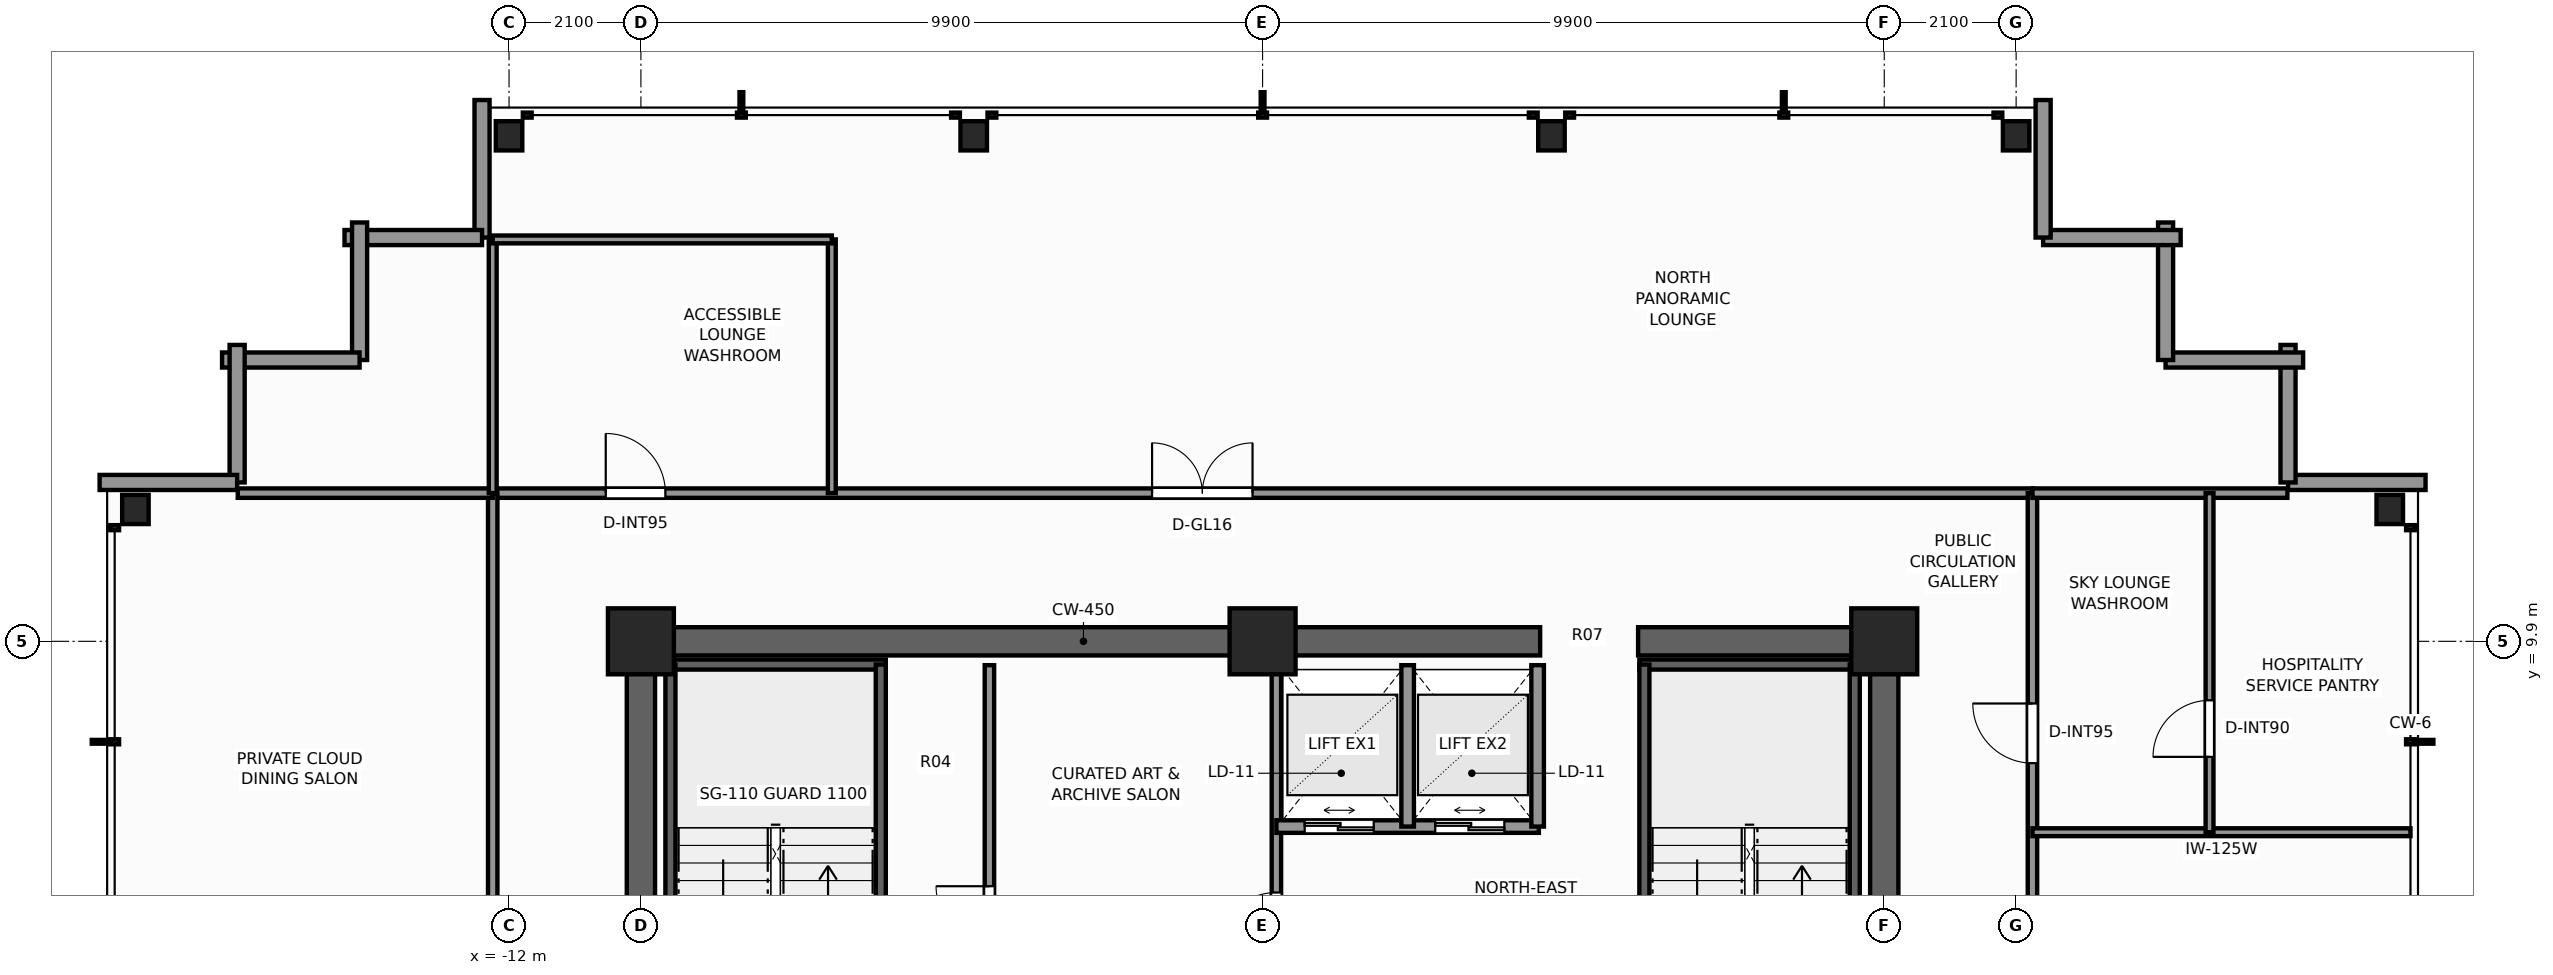
"""IFC4 building model, lengths in metres.
Left out: names, types, materials, properties, quantities, classifications, styles, units other than length and angle.
Written with IfcOpenShell. Run it as: python <this file> out.ifc"""

import sys

from ifc_helpers import new_model, si_unit, direction, frame, frame_2d, origin, origin_2d, place, context, subcontext, project, spatial, rectangle, i_section, extrude, element, fill, save


model = new_model("IFC4")
c1 = context("Model", 3, precision=1e-05, world=origin(), true_north=direction((0.0, 1.0)))
c2 = subcontext(c1, "Body", "Model", "MODEL_VIEW")
j1 = project(units=[si_unit("LENGTHUNIT", "METRE"), si_unit("PLANEANGLEUNIT", "RADIAN")], contexts=[c1])
p1 = place(None, origin())
s1 = spatial("IfcSite", under=j1, at=p1, CompositionType="ELEMENT")
p2 = place(p1, origin())
s2 = spatial("IfcBuilding", under=s1, at=p2, CompositionType="ELEMENT")
p3 = place(p2, frame((0.0, 0.0, 258.4)))
s3 = spatial("IfcBuildingStorey", under=s2, at=p3, CompositionType="ELEMENT", Elevation=258.4)
p4 = place(p3, frame((-10.125, 9.9, 0.0), z_axis=(0.0, 0.0, 1.0), x_axis=(1.0, 0.0, 0.0)))
e1 = element("IfcWall", 1, at=p4, inside=s3, PredefinedType="SHEAR", context=c2, shape_type="SweptSolid", body=[
    extrude(rectangle(XDim=14.545, YDim=0.45, at=frame_2d((7.272, 0.0))), origin(), (0.0, 0.0, 1.0), 4.4),
])
p5 = place(p3, frame((5.98, 9.9, 0.0), z_axis=(0.0, 0.0, 1.0), x_axis=(1.0, 0.0, 0.0)))
e2 = element("IfcWall", 2, at=p5, inside=s3, PredefinedType="SHEAR", context=c2, shape_type="SweptSolid", body=[
    extrude(rectangle(XDim=4.145, YDim=0.45, at=frame_2d((2.073, 0.0))), origin(), (0.0, 0.0, 1.0), 4.4),
])
p6 = place(p3, frame((-9.9, -3.7, 0.0), z_axis=(0.0, 0.0, 1.0), x_axis=(0.0, 1.0, 0.0)))
e3 = element("IfcWall", 3, at=p6, inside=s3, PredefinedType="SHEAR", context=c2, shape_type="SweptSolid", body=[
    extrude(rectangle(XDim=13.375, YDim=0.45, at=frame_2d((6.688, 0.0))), origin(), (0.0, 0.0, 1.0), 4.4),
])
p7 = place(p6, frame((0.35, 0.0, 0.0)))
e4 = element("IfcOpeningElement", 4, at=p7, cuts=e3, PredefinedType="OPENING", context=c2, shape_type="SweptSolid", body=[
    extrude(rectangle(XDim=1.1, YDim=2.2, at=frame_2d((0.55, 1.1))), frame((0.0, 0.235, 0.0), z_axis=(0.0, -1.0, 0.0), x_axis=(1.0, 0.0, 0.0)), (0.0, 0.0, 1.0), 0.47),
])
p8 = place(p3, frame((9.9, -3.7, 0.0), z_axis=(0.0, 0.0, 1.0), x_axis=(0.0, 1.0, 0.0)))
e5 = element("IfcWall", 5, at=p8, inside=s3, PredefinedType="SHEAR", context=c2, shape_type="SweptSolid", body=[
    extrude(rectangle(XDim=13.375, YDim=0.45, at=frame_2d((6.688, 0.0))), origin(), (0.0, 0.0, 1.0), 4.4),
])
p9 = place(p8, frame((0.35, 0.0, 0.0)))
e6 = element("IfcOpeningElement", 6, at=p9, cuts=e5, PredefinedType="OPENING", context=c2, shape_type="SweptSolid", body=[
    extrude(rectangle(XDim=1.1, YDim=2.2, at=frame_2d((0.55, 1.1))), frame((0.0, 0.235, 0.0), z_axis=(0.0, -1.0, 0.0), x_axis=(1.0, 0.0, 0.0)), (0.0, 0.0, 1.0), 0.47),
])
for number, where, z_axis, x_axis in (
    (7, (9.9, 9.9, 0.0), (0.0, 0.0, 1.0), (1.0, 0.0, 0.0)),
    (8, (-9.9, 9.9, 0.0), (0.0, 0.0, 1.0), (1.0, 0.0, 0.0)),
    (9, (0.0, 9.9, 0.0), (0.0, 0.0, 1.0), (1.0, 0.0, 0.0)),
):
    element("IfcColumn", number, at=place(p3, frame(where, z_axis=z_axis, x_axis=x_axis)), inside=s3, PredefinedType="COLUMN", context=c2, shape_type="SweptSolid", body=[
        extrude(rectangle(XDim=1.05, YDim=1.05, at=origin_2d()), origin(), (0.0, 0.0, 1.0), 4.4),
    ])
for number, where, z_axis, x_axis in (
    (10, (-12.0, 17.95, 0.0), (0.0, 0.0, 1.0), (1.0, 0.0, 0.0)),
    (11, (-4.6, 17.95, 0.0), (0.0, 0.0, 1.0), (1.0, 0.0, 0.0)),
    (12, (4.6, 17.95, 0.0), (0.0, 0.0, 1.0), (1.0, 0.0, 0.0)),
    (13, (12.0, 17.95, 0.0), (0.0, 0.0, 1.0), (1.0, 0.0, 0.0)),
    (14, (-17.95, 12.0, 0.0), (0.0, 0.0, 1.0), (1.0, 0.0, 0.0)),
    (15, (17.95, 12.0, 0.0), (0.0, 0.0, 1.0), (1.0, 0.0, 0.0)),
):
    element("IfcColumn", number, at=place(p3, frame(where, z_axis=z_axis, x_axis=x_axis)), inside=s3, PredefinedType="COLUMN", context=c2, shape_type="SweptSolid", body=[
        extrude(i_section(OverallWidth=0.422, OverallDepth=0.465, WebThickness=0.045, FlangeThickness=0.073, FilletRadius=0.025, at=origin_2d()), origin(), (0.0, 0.0, 1.0), 4.4),
    ])
p10 = place(p3, frame((16.33, 12.43, 0.0), z_axis=(0.0, 0.0, 1.0), x_axis=(1.0, 0.0, 0.0)))
e16 = element("IfcWall", 16, at=p10, inside=s3, PredefinedType="STANDARD", context=c2, shape_type="SweptSolid", body=[
    extrude(rectangle(XDim=2.19, YDim=0.24, at=frame_2d((1.095, 0.0))), origin(), (0.0, 0.0, 1.0), 3.503),
])
for number, where, z_axis, x_axis in (
    (17, (16.33, 14.62, 0.0), (0.0, 0.0, 1.0), (0.0, -1.0, 0.0)),
    (18, (14.38, 14.38, 0.0), (0.0, 0.0, 1.0), (1.0, 0.0, 0.0)),
    (19, (14.38, 16.57, 0.0), (0.0, 0.0, 1.0), (0.0, -1.0, 0.0)),
    (20, (12.43, 16.33, 0.0), (0.0, 0.0, 1.0), (1.0, 0.0, 0.0)),
):
    element("IfcWall", number, at=place(p3, frame(where, z_axis=z_axis, x_axis=x_axis)), inside=s3, PredefinedType="STANDARD", context=c2, shape_type="SweptSolid", body=[
        extrude(rectangle(XDim=2.19, YDim=0.24, at=frame_2d((1.095, 0.0))), origin(), (0.0, 0.0, 1.0), 3.503),
    ])
for number, where, z_axis, x_axis in (
    (21, (12.43, 18.52, 0.0), (0.0, 0.0, 1.0), (0.0, -1.0, 0.0)),
    (22, (-12.43, 16.33, 0.0), (0.0, 0.0, 1.0), (0.0, 1.0, 0.0)),
):
    element("IfcWall", number, at=place(p3, frame(where, z_axis=z_axis, x_axis=x_axis)), inside=s3, PredefinedType="STANDARD", context=c2, shape_type="SweptSolid", body=[
        extrude(rectangle(XDim=2.19, YDim=0.24, at=frame_2d((1.095, 0.0))), origin(), (0.0, 0.0, 1.0), 3.503),
    ])
for number, where, z_axis, x_axis in (
    (23, (-14.62, 16.33, 0.0), (0.0, 0.0, 1.0), (1.0, 0.0, 0.0)),
    (24, (-14.38, 14.38, 0.0), (0.0, 0.0, 1.0), (0.0, 1.0, 0.0)),
    (25, (-16.57, 14.38, 0.0), (0.0, 0.0, 1.0), (1.0, 0.0, 0.0)),
    (26, (-16.33, 12.43, 0.0), (0.0, 0.0, 1.0), (0.0, 1.0, 0.0)),
):
    element("IfcWall", number, at=place(p3, frame(where, z_axis=z_axis, x_axis=x_axis)), inside=s3, PredefinedType="STANDARD", context=c2, shape_type="SweptSolid", body=[
        extrude(rectangle(XDim=2.19, YDim=0.24, at=frame_2d((1.095, 0.0))), origin(), (0.0, 0.0, 1.0), 3.503),
    ])
p11 = place(p3, frame((-18.52, 12.43, 0.0), z_axis=(0.0, 0.0, 1.0), x_axis=(1.0, 0.0, 0.0)))
e27 = element("IfcWall", 27, at=p11, inside=s3, PredefinedType="STANDARD", context=c2, shape_type="SweptSolid", body=[
    extrude(rectangle(XDim=2.19, YDim=0.24, at=frame_2d((1.095, 0.0))), origin(), (0.0, 0.0, 1.0), 3.503),
])
p12 = place(p3, frame((-9.52, 9.53, 0.0), z_axis=(0.0, 0.0, 1.0), x_axis=(1.0, 0.0, 0.0)))
e28 = element("IfcWall", 28, at=p12, inside=s3, PredefinedType="SHEAR", context=c2, shape_type="SweptSolid", body=[
    extrude(rectangle(XDim=3.52, YDim=0.16, at=frame_2d((1.76, 0.0))), origin(), (0.0, 0.0, 1.0), 4.4),
])
for number, where, z_axis, x_axis in (
    (29, (-9.43, 1.97, 0.0), (0.0, 0.0, 1.0), (0.0, 1.0, 0.0)),
    (30, (-6.08, 1.97, 0.0), (0.0, 0.0, 1.0), (0.0, 1.0, 0.0)),
):
    element("IfcWall", number, at=place(p3, frame(where, z_axis=z_axis, x_axis=x_axis)), inside=s3, PredefinedType="SHEAR", context=c2, shape_type="SweptSolid", body=[
        extrude(rectangle(XDim=7.56, YDim=0.16, at=frame_2d((3.78, 0.0))), origin(), (0.0, 0.0, 1.0), 4.4),
    ])
p13 = place(p3, frame((6.0, 9.53, 0.0), z_axis=(0.0, 0.0, 1.0), x_axis=(1.0, 0.0, 0.0)))
e31 = element("IfcWall", 31, at=p13, inside=s3, PredefinedType="SHEAR", context=c2, shape_type="SweptSolid", body=[
    extrude(rectangle(XDim=3.52, YDim=0.16, at=frame_2d((1.76, 0.0))), origin(), (0.0, 0.0, 1.0), 4.4),
])
for number, where, z_axis, x_axis in (
    (32, (6.08, 1.97, 0.0), (0.0, 0.0, 1.0), (0.0, 1.0, 0.0)),
    (33, (9.43, 1.97, 0.0), (0.0, 0.0, 1.0), (0.0, 1.0, 0.0)),
):
    element("IfcWall", number, at=place(p3, frame(where, z_axis=z_axis, x_axis=x_axis)), inside=s3, PredefinedType="SHEAR", context=c2, shape_type="SweptSolid", body=[
        extrude(rectangle(XDim=7.56, YDim=0.16, at=frame_2d((3.78, 0.0))), origin(), (0.0, 0.0, 1.0), 4.4),
    ])
p14 = place(p3, frame((0.22, 4.3, 0.0), z_axis=(0.0, 0.0, 1.0), x_axis=(0.0, 1.0, 0.0)))
e34 = element("IfcWall", 34, at=p14, inside=s3, PredefinedType="PARTITIONING", context=c2, shape_type="SweptSolid", body=[
    extrude(rectangle(XDim=5.22, YDim=0.15, at=frame_2d((2.61, 0.0))), origin(), (0.0, 0.0, 1.0), 4.12),
])
p15 = place(p14, frame((0.65, 0.0, 0.0)))
e35 = element("IfcOpeningElement", 35, at=p15, cuts=e34, PredefinedType="OPENING", context=c2, shape_type="SweptSolid", body=[
    extrude(rectangle(XDim=0.95, YDim=2.06, at=frame_2d((0.475, 1.03))), frame((0.0, 0.085, 0.0), z_axis=(0.0, -1.0, 0.0), x_axis=(1.0, 0.0, 0.0)), (0.0, 0.0, 1.0), 0.17),
])
p16 = place(p3, frame((-4.35, 4.3, 0.0), z_axis=(0.0, 0.0, 1.0), x_axis=(0.0, 1.0, 0.0)))
e36 = element("IfcWall", 36, at=p16, inside=s3, PredefinedType="PARTITIONING", context=c2, shape_type="SweptSolid", body=[
    extrude(rectangle(XDim=5.22, YDim=0.15, at=frame_2d((2.61, 0.0))), origin(), (0.0, 0.0, 1.0), 4.12),
])
p17 = place(p16, frame((0.85, 0.0, 0.0)))
e37 = element("IfcOpeningElement", 37, at=p17, cuts=e36, PredefinedType="OPENING", context=c2, shape_type="SweptSolid", body=[
    extrude(rectangle(XDim=0.85, YDim=2.03, at=frame_2d((0.425, 1.015))), frame((0.0, 0.085, 0.0), z_axis=(0.0, -1.0, 0.0), x_axis=(1.0, 0.0, 0.0)), (0.0, 0.0, 1.0), 0.17),
])
p18 = place(p3, frame((0.22, 6.95, 0.0), z_axis=(0.0, 0.0, 1.0), x_axis=(1.0, 0.0, 0.0)))
e38 = element("IfcWall", 38, at=p18, inside=s3, PredefinedType="SOLIDWALL", context=c2, shape_type="SweptSolid", body=[
    extrude(rectangle(XDim=4.18, YDim=0.2, at=frame_2d((2.09, 0.0))), origin(), (0.0, 0.0, 1.0), 4.12),
])
p19 = place(p18, frame((0.45, 0.0, 0.0)))
e39 = element("IfcOpeningElement", 39, at=p19, cuts=e38, PredefinedType="OPENING", context=c2, shape_type="SweptSolid", body=[
    extrude(rectangle(XDim=1.1, YDim=2.2, at=frame_2d((0.55, 1.1))), frame((0.0, 0.11, 0.0), z_axis=(0.0, -1.0, 0.0), x_axis=(1.0, 0.0, 0.0)), (0.0, 0.0, 1.0), 0.22),
])
p20 = place(p18, frame((2.53, 0.0, 0.0)))
e40 = element("IfcOpeningElement", 40, at=p20, cuts=e38, PredefinedType="OPENING", context=c2, shape_type="SweptSolid", body=[
    extrude(rectangle(XDim=1.1, YDim=2.2, at=frame_2d((0.55, 1.1))), frame((0.0, 0.11, 0.0), z_axis=(0.0, -1.0, 0.0), x_axis=(1.0, 0.0, 0.0)), (0.0, 0.0, 1.0), 0.22),
])
for number, where, z_axis, x_axis in (
    (41, (4.38, 6.95, 0.0), (0.0, 0.0, 1.0), (0.0, 1.0, 0.0)),
    (42, (2.31, 6.95, 0.0), (0.0, 0.0, 1.0), (0.0, 1.0, 0.0)),
):
    element("IfcWall", number, at=place(p3, frame(where, z_axis=z_axis, x_axis=x_axis)), inside=s3, PredefinedType="SOLIDWALL", context=c2, shape_type="SweptSolid", body=[
        extrude(rectangle(XDim=2.57, YDim=0.2, at=frame_2d((1.285, 0.0))), origin(), (0.0, 0.0, 1.0), 4.12),
    ])
p21 = place(p3, frame((-12.26, 12.26, 0.0), z_axis=(0.0, 0.0, 1.0), x_axis=(1.0, 0.0, 0.0)))
e43 = element("IfcWall", 43, at=p21, inside=s3, PredefinedType="PARTITIONING", context=c2, shape_type="SweptSolid", body=[
    extrude(rectangle(XDim=24.52, YDim=0.15, at=frame_2d((12.26, 0.0))), origin(), (0.0, 0.0, 1.0), 3.409),
])
p22 = place(p21, frame((1.8, 0.0, 0.0)))
e44 = element("IfcOpeningElement", 44, at=p22, cuts=e43, PredefinedType="OPENING", context=c2, shape_type="SweptSolid", body=[
    extrude(rectangle(XDim=0.95, YDim=2.06, at=frame_2d((0.475, 1.03))), frame((0.0, 0.085, 0.0), z_axis=(0.0, -1.0, 0.0), x_axis=(1.0, 0.0, 0.0)), (0.0, 0.0, 1.0), 0.17),
])
p23 = place(p21, frame((10.5, 0.0, 0.0)))
e45 = element("IfcOpeningElement", 45, at=p23, cuts=e43, PredefinedType="OPENING", context=c2, shape_type="SweptSolid", body=[
    extrude(rectangle(XDim=1.6, YDim=2.3, at=frame_2d((0.8, 1.15))), frame((0.0, 0.085, 0.0), z_axis=(0.0, -1.0, 0.0), x_axis=(1.0, 0.0, 0.0)), (0.0, 0.0, 1.0), 0.17),
])
p24 = place(p3, frame((-12.26, -12.26, 0.0), z_axis=(0.0, 0.0, 1.0), x_axis=(0.0, 1.0, 0.0)))
e46 = element("IfcWall", 46, at=p24, inside=s3, PredefinedType="PARTITIONING", context=c2, shape_type="SweptSolid", body=[
    extrude(rectangle(XDim=24.52, YDim=0.15, at=frame_2d((12.26, 0.0))), origin(), (0.0, 0.0, 1.0), 3.409),
])
p25 = place(p24, frame((11.5, 0.0, 0.0)))
e47 = element("IfcOpeningElement", 47, at=p25, cuts=e46, PredefinedType="OPENING", context=c2, shape_type="SweptSolid", body=[
    extrude(rectangle(XDim=1.2, YDim=2.2, at=frame_2d((0.6, 1.1))), frame((0.0, 0.085, 0.0), z_axis=(0.0, -1.0, 0.0), x_axis=(1.0, 0.0, 0.0)), (0.0, 0.0, 1.0), 0.17),
])
p26 = place(p3, frame((12.26, -12.26, 0.0), z_axis=(0.0, 0.0, 1.0), x_axis=(0.0, 1.0, 0.0)))
e48 = element("IfcWall", 48, at=p26, inside=s3, PredefinedType="PARTITIONING", context=c2, shape_type="SweptSolid", body=[
    extrude(rectangle(XDim=24.52, YDim=0.15, at=frame_2d((12.26, 0.0))), origin(), (0.0, 0.0, 1.0), 3.409),
])
p27 = place(p26, frame((3.4, 0.0, 0.0)))
e49 = element("IfcOpeningElement", 49, at=p27, cuts=e48, PredefinedType="OPENING", context=c2, shape_type="SweptSolid", body=[
    extrude(rectangle(XDim=0.95, YDim=2.06, at=frame_2d((0.475, 1.03))), frame((0.0, 0.085, 0.0), z_axis=(0.0, -1.0, 0.0), x_axis=(1.0, 0.0, 0.0)), (0.0, 0.0, 1.0), 0.17),
])
p28 = place(p26, frame((20.22, 0.0, 0.0)))
e50 = element("IfcOpeningElement", 50, at=p28, cuts=e48, PredefinedType="OPENING", context=c2, shape_type="SweptSolid", body=[
    extrude(rectangle(XDim=0.95, YDim=2.06, at=frame_2d((0.475, 1.03))), frame((0.0, 0.085, 0.0), z_axis=(0.0, -1.0, 0.0), x_axis=(1.0, 0.0, 0.0)), (0.0, 0.0, 1.0), 0.17),
])
for number, where, z_axis, x_axis in (
    (51, (-16.32, 12.26, 0.0), (0.0, 0.0, 1.0), (1.0, 0.0, 0.0)),
    (52, (12.26, 12.26, 0.0), (0.0, 0.0, 1.0), (1.0, 0.0, 0.0)),
):
    element("IfcWall", number, at=place(p3, frame(where, z_axis=z_axis, x_axis=x_axis)), inside=s3, PredefinedType="PARTITIONING", context=c2, shape_type="SweptSolid", body=[
        extrude(rectangle(XDim=4.06, YDim=0.15, at=frame_2d((2.03, 0.0))), origin(), (0.0, 0.0, 1.0), 4.12),
    ])
p29 = place(p3, frame((12.26, 6.86, 0.0), z_axis=(0.0, 0.0, 1.0), x_axis=(1.0, 0.0, 0.0)))
e53 = element("IfcWall", 53, at=p29, inside=s3, PredefinedType="PARTITIONING", context=c2, shape_type="SweptSolid", body=[
    extrude(rectangle(XDim=6.02, YDim=0.125, at=frame_2d((3.01, 0.0))), origin(), (0.0, 0.0, 1.0), 3.493),
])
p30 = place(p3, frame((15.08, 6.86, 0.0), z_axis=(0.0, 0.0, 1.0), x_axis=(0.0, 1.0, 0.0)))
e54 = element("IfcWall", 54, at=p30, inside=s3, PredefinedType="PARTITIONING", context=c2, shape_type="SweptSolid", body=[
    extrude(rectangle(XDim=5.4, YDim=0.125, at=frame_2d((2.7, 0.0))), origin(), (0.0, 0.0, 1.0), 3.409),
])
p31 = place(p30, frame((1.2, 0.0, 0.0)))
e55 = element("IfcOpeningElement", 55, at=p31, cuts=e54, PredefinedType="OPENING", context=c2, shape_type="SweptSolid", body=[
    extrude(rectangle(XDim=0.9, YDim=2.06, at=frame_2d((0.45, 1.03))), frame((0.0, 0.073, 0.0), z_axis=(0.0, -1.0, 0.0), x_axis=(1.0, 0.0, 0.0)), (0.0, 0.0, 1.0), 0.145),
])
for number, where, z_axis, x_axis in (
    (56, (-12.26, 12.26, 0.0), (0.0, 0.0, 1.0), (0.0, 1.0, 0.0)),
    (57, (-6.86, 12.26, 0.0), (0.0, 0.0, 1.0), (0.0, 1.0, 0.0)),
):
    element("IfcWall", number, at=place(p3, frame(where, z_axis=z_axis, x_axis=x_axis)), inside=s3, PredefinedType="PARTITIONING", context=c2, shape_type="SweptSolid", body=[
        extrude(rectangle(XDim=4.04, YDim=0.125, at=frame_2d((2.02, 0.0))), origin(), (0.0, 0.0, 1.0), 4.12),
    ])
p32 = place(p3, frame((-12.26, 16.3, 0.0), z_axis=(0.0, 0.0, 1.0), x_axis=(1.0, 0.0, 0.0)))
e58 = element("IfcWall", 58, at=p32, inside=s3, PredefinedType="PARTITIONING", context=c2, shape_type="SweptSolid", body=[
    extrude(rectangle(XDim=5.4, YDim=0.125, at=frame_2d((2.7, 0.0))), origin(), (0.0, 0.0, 1.0), 3.409),
])
p33 = place(p15, origin())
e59 = element("IfcDoor", 59, at=p33, inside=s3, OperationType="SINGLE_SWING_LEFT", PredefinedType="DOOR", context=c2, shape_type="SweptSolid", body=[
    extrude(rectangle(XDim=0.95, YDim=2.06, at=frame_2d((0.475, 1.03))), frame((0.0, 0.025, 0.0), z_axis=(0.0, -1.0, 0.0), x_axis=(1.0, 0.0, 0.0)), (0.0, 0.0, 1.0), 0.05),
])
fill(e35, e59)
p34 = place(p17, origin())
e60 = element("IfcDoor", 60, at=p34, inside=s3, OperationType="SINGLE_SWING_RIGHT", PredefinedType="DOOR", context=c2, shape_type="SweptSolid", body=[
    extrude(rectangle(XDim=0.85, YDim=2.03, at=frame_2d((0.425, 1.015))), frame((0.0, 0.025, 0.0), z_axis=(0.0, -1.0, 0.0), x_axis=(1.0, 0.0, 0.0)), (0.0, 0.0, 1.0), 0.05),
])
fill(e37, e60)
p35 = place(p19, origin())
e61 = element("IfcDoor", 61, at=p35, inside=s3, OperationType="DOUBLE_DOOR_SLIDING", PredefinedType="DOOR", context=c2, shape_type="SweptSolid", body=[
    extrude(rectangle(XDim=1.1, YDim=2.2, at=frame_2d((0.55, 1.1))), frame((0.0, 0.025, 0.0), z_axis=(0.0, -1.0, 0.0), x_axis=(1.0, 0.0, 0.0)), (0.0, 0.0, 1.0), 0.05),
])
fill(e39, e61)
p36 = place(p20, origin())
e62 = element("IfcDoor", 62, at=p36, inside=s3, OperationType="DOUBLE_DOOR_SLIDING", PredefinedType="DOOR", context=c2, shape_type="SweptSolid", body=[
    extrude(rectangle(XDim=1.1, YDim=2.2, at=frame_2d((0.55, 1.1))), frame((0.0, 0.025, 0.0), z_axis=(0.0, -1.0, 0.0), x_axis=(1.0, 0.0, 0.0)), (0.0, 0.0, 1.0), 0.05),
])
fill(e40, e62)
p37 = place(p28, origin())
e63 = element("IfcDoor", 63, at=p37, inside=s3, OperationType="SINGLE_SWING_RIGHT", PredefinedType="DOOR", context=c2, shape_type="SweptSolid", body=[
    extrude(rectangle(XDim=0.95, YDim=2.06, at=frame_2d((0.475, 1.03))), frame((0.0, 0.025, 0.0), z_axis=(0.0, -1.0, 0.0), x_axis=(1.0, 0.0, 0.0)), (0.0, 0.0, 1.0), 0.05),
])
fill(e50, e63)
p38 = place(p31, origin())
e64 = element("IfcDoor", 64, at=p38, inside=s3, OperationType="SINGLE_SWING_LEFT", PredefinedType="DOOR", context=c2, shape_type="SweptSolid", body=[
    extrude(rectangle(XDim=0.9, YDim=2.06, at=frame_2d((0.45, 1.03))), frame((0.0, 0.025, 0.0), z_axis=(0.0, -1.0, 0.0), x_axis=(1.0, 0.0, 0.0)), (0.0, 0.0, 1.0), 0.05),
])
fill(e55, e64)
p39 = place(p22, origin())
e65 = element("IfcDoor", 65, at=p39, inside=s3, OperationType="SINGLE_SWING_LEFT", PredefinedType="DOOR", context=c2, shape_type="SweptSolid", body=[
    extrude(rectangle(XDim=0.95, YDim=2.06, at=frame_2d((0.475, 1.03))), frame((0.0, 0.025, 0.0), z_axis=(0.0, -1.0, 0.0), x_axis=(1.0, 0.0, 0.0)), (0.0, 0.0, 1.0), 0.05),
])
fill(e44, e65)
p40 = place(p23, origin())
e66 = element("IfcDoor", 66, at=p40, inside=s3, OperationType="DOUBLE_DOOR_SINGLE_SWING", PredefinedType="DOOR", context=c2, shape_type="SweptSolid", body=[
    extrude(rectangle(XDim=1.6, YDim=2.3, at=frame_2d((0.8, 1.15))), frame((0.0, 0.025, 0.0), z_axis=(0.0, -1.0, 0.0), x_axis=(1.0, 0.0, 0.0)), (0.0, 0.0, 1.0), 0.05),
])
fill(e45, e66)
save(model, sys.argv[1])
